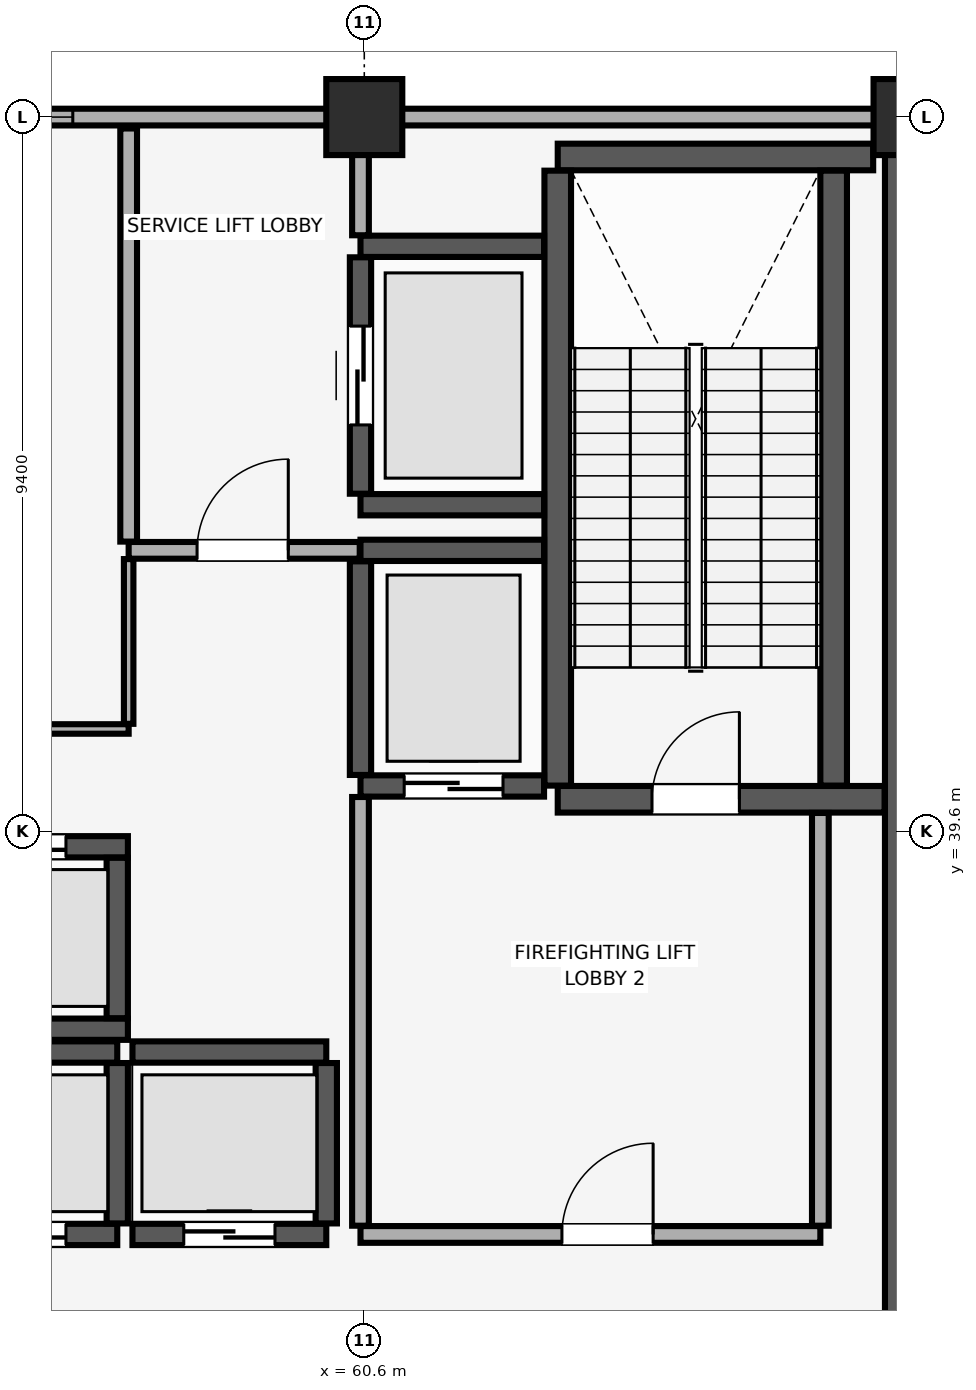
"""IFC4 building model, lengths in metres.
Left out: names, types, materials, properties, quantities, classifications, styles, units other than length and angle.
Written with IfcOpenShell. Run it as: python <this file> out.ifc"""

import sys

from ifc_helpers import new_model, si_unit, direction, frame, frame_2d, origin, origin_2d, place, context, subcontext, project, spatial, rectangle, extrude, element, fill, save


model = new_model("IFC4")
c1 = context("Model", 3, precision=1e-05, world=origin(), true_north=direction((0.0, 1.0)))
c2 = subcontext(c1, "Body", "Model", "MODEL_VIEW")
j1 = project(units=[si_unit("LENGTHUNIT", "METRE"), si_unit("PLANEANGLEUNIT", "RADIAN")], contexts=[c1])
p1 = place(None, origin())
s1 = spatial("IfcSite", under=j1, at=p1, CompositionType="ELEMENT")
p2 = place(p1, origin())
s2 = spatial("IfcBuilding", under=s1, at=p2, CompositionType="ELEMENT")
p3 = place(p2, frame((0.0, 0.0, 294.7)))
s3 = spatial("IfcBuildingStorey", under=s2, at=p3, CompositionType="ELEMENT", Elevation=294.7)
for number, where, z_axis, x_axis in (
    (1, (60.6, 49.0, 0.0), (0.0, 0.0, 1.0), (1.0, 0.0, 0.0)),
    (2, (67.8, 49.0, 0.0), (0.0, 0.0, 1.0), (1.0, 0.0, 0.0)),
):
    element("IfcColumn", number, at=place(p3, frame(where, z_axis=z_axis, x_axis=x_axis)), inside=s3, PredefinedType="COLUMN", context=c2, shape_type="SweptSolid", body=[
        extrude(rectangle(XDim=1.0, YDim=1.0, at=origin_2d()), origin(), (0.0, 0.0, 1.0), 5.12),
    ])
p4 = place(p3, frame((71.4, 49.0, 0.0), z_axis=(0.0, 0.0, 1.0), x_axis=(-1.0, 0.0, 0.0)))
e3 = element("IfcWall", 3, at=p4, inside=s3, PredefinedType="SOLIDWALL", context=c2, shape_type="SweptSolid", body=[
    extrude(rectangle(XDim=58.8, YDim=0.22, at=frame_2d((29.4, 0.0))), origin(), (0.0, 0.0, 1.0), 4.32),
])
p5 = place(p4, frame((56.365, 0.0, 0.85)))
e4 = element("IfcOpeningElement", 4, at=p5, cuts=e3, PredefinedType="OPENING", context=c2, shape_type="SweptSolid", body=[
    extrude(rectangle(XDim=1.5, YDim=1.4, at=frame_2d((0.75, 0.7))), frame((0.0, 0.12, 0.0), z_axis=(0.0, -1.0, 0.0), x_axis=(1.0, 0.0, 0.0)), (0.0, 0.0, 1.0), 0.24),
])
p6 = place(p4, frame((0.935, 0.0, 0.85)))
e5 = element("IfcOpeningElement", 5, at=p6, cuts=e3, PredefinedType="OPENING", context=c2, shape_type="SweptSolid", body=[
    extrude(rectangle(XDim=1.5, YDim=1.4, at=frame_2d((0.75, 0.7))), frame((0.0, 0.12, 0.0), z_axis=(0.0, -1.0, 0.0), x_axis=(1.0, 0.0, 0.0)), (0.0, 0.0, 1.0), 0.24),
])
p7 = place(p4, frame((43.865, 0.0, 0.9)))
e6 = element("IfcOpeningElement", 6, at=p7, cuts=e3, PredefinedType="OPENING", context=c2, shape_type="SweptSolid", body=[
    extrude(rectangle(XDim=1.5, YDim=1.4, at=frame_2d((0.75, 0.7))), frame((0.0, 0.12, 0.0), z_axis=(0.0, -1.0, 0.0), x_axis=(1.0, 0.0, 0.0)), (0.0, 0.0, 1.0), 0.24),
])
p8 = place(p4, frame((36.05, 0.0, 0.9)))
e7 = element("IfcOpeningElement", 7, at=p8, cuts=e3, PredefinedType="OPENING", context=c2, shape_type="SweptSolid", body=[
    extrude(rectangle(XDim=3.6, YDim=1.5, at=frame_2d((1.8, 0.75))), frame((0.0, 0.12, 0.0), z_axis=(0.0, -1.0, 0.0), x_axis=(1.0, 0.0, 0.0)), (0.0, 0.0, 1.0), 0.24),
])
p9 = place(p4, frame((22.65, 0.0, 0.9)))
e8 = element("IfcOpeningElement", 8, at=p9, cuts=e3, PredefinedType="OPENING", context=c2, shape_type="SweptSolid", body=[
    extrude(rectangle(XDim=1.5, YDim=1.4, at=frame_2d((0.75, 0.7))), frame((0.0, 0.12, 0.0), z_axis=(0.0, -1.0, 0.0), x_axis=(1.0, 0.0, 0.0)), (0.0, 0.0, 1.0), 0.24),
])
p10 = place(p4, frame((19.0, 0.0, 0.9)))
e9 = element("IfcOpeningElement", 9, at=p10, cuts=e3, PredefinedType="OPENING", context=c2, shape_type="SweptSolid", body=[
    extrude(rectangle(XDim=2.4, YDim=1.5, at=frame_2d((1.2, 0.75))), frame((0.0, 0.12, 0.0), z_axis=(0.0, -1.0, 0.0), x_axis=(1.0, 0.0, 0.0)), (0.0, 0.0, 1.0), 0.24),
])
p11 = place(p4, frame((14.635, 0.0, 0.9)))
e10 = element("IfcOpeningElement", 10, at=p11, cuts=e3, PredefinedType="OPENING", context=c2, shape_type="SweptSolid", body=[
    extrude(rectangle(XDim=2.4, YDim=1.5, at=frame_2d((1.2, 0.75))), frame((0.0, 0.12, 0.0), z_axis=(0.0, -1.0, 0.0), x_axis=(1.0, 0.0, 0.0)), (0.0, 0.0, 1.0), 0.24),
])
p12 = place(p3, frame((67.8, 29.4, 0.0), z_axis=(0.0, 0.0, 1.0), x_axis=(0.0, 1.0, 0.0)))
e11 = element("IfcWall", 11, at=p12, inside=s3, PredefinedType="SHEAR", context=c2, shape_type="SweptSolid", body=[
    extrude(rectangle(XDim=19.2, YDim=0.7, at=frame_2d((9.6, 0.0))), origin(), (0.0, 0.0, 1.0), 5.12),
])
p13 = place(p3, frame((63.145, 40.025, 0.0), z_axis=(0.0, 0.0, 1.0), x_axis=(1.0, 0.0, 0.0)))
e12 = element("IfcWall", 12, at=p13, inside=s3, PredefinedType="SHEAR", context=c2, shape_type="SweptSolid", body=[
    extrude(rectangle(XDim=4.3, YDim=0.35, at=frame_2d((2.15, 0.0))), origin(), (0.0, 0.0, 1.0), 5.12),
])
p14 = place(p13, frame((1.24, 0.0, 0.0)))
e13 = element("IfcOpeningElement", 13, at=p14, cuts=e12, PredefinedType="OPENING", context=c2, shape_type="SweptSolid", body=[
    extrude(rectangle(XDim=1.15, YDim=2.15, at=frame_2d((0.575, 1.075))), frame((0.0, 0.185, 0.0), z_axis=(0.0, -1.0, 0.0), x_axis=(1.0, 0.0, 0.0)), (0.0, 0.0, 1.0), 0.37),
])
p15 = place(p3, frame((63.145, 48.475, 0.0), z_axis=(0.0, 0.0, 1.0), x_axis=(1.0, 0.0, 0.0)))
e14 = element("IfcWall", 14, at=p15, inside=s3, PredefinedType="SHEAR", context=c2, shape_type="SweptSolid", body=[
    extrude(rectangle(XDim=4.15, YDim=0.35, at=frame_2d((2.075, 0.0))), origin(), (0.0, 0.0, 1.0), 5.12),
])
for number, where, z_axis, x_axis in (
    (15, (63.145, 40.205, 0.0), (0.0, 0.0, 1.0), (0.0, 1.0, 0.0)),
    (16, (66.775, 40.205, 0.0), (0.0, 0.0, 1.0), (0.0, 1.0, 0.0)),
):
    element("IfcWall", number, at=place(p3, frame(where, z_axis=z_axis, x_axis=x_axis)), inside=s3, PredefinedType="SHEAR", context=c2, shape_type="SweptSolid", body=[
        extrude(rectangle(XDim=8.09, YDim=0.35, at=frame_2d((4.045, 0.0))), origin(), (0.0, 0.0, 1.0), 5.12),
    ])
p16 = place(p3, frame((54.8, 34.3, 0.0), z_axis=(0.0, 0.0, 1.0), x_axis=(1.0, 0.0, 0.0)))
e17 = element("IfcWall", 17, at=p16, inside=s3, PredefinedType="SHEAR", context=c2, shape_type="SweptSolid", body=[
    extrude(rectangle(XDim=2.55, YDim=0.28, at=frame_2d((1.275, 0.0))), origin(), (0.0, 0.0, 1.0), 5.12),
])
p17 = place(p16, frame((0.675, 0.0, 0.0)))
e18 = element("IfcOpeningElement", 18, at=p17, cuts=e17, PredefinedType="OPENING", context=c2, shape_type="SweptSolid", body=[
    extrude(rectangle(XDim=1.2, YDim=2.25, at=frame_2d((0.6, 1.125))), frame((0.0, 0.15, 0.0), z_axis=(0.0, -1.0, 0.0), x_axis=(1.0, 0.0, 0.0)), (0.0, 0.0, 1.0), 0.3),
])
p18 = place(p3, frame((54.8, 36.7, 0.0), z_axis=(0.0, 0.0, 1.0), x_axis=(1.0, 0.0, 0.0)))
e19 = element("IfcWall", 19, at=p18, inside=s3, PredefinedType="SHEAR", context=c2, shape_type="SweptSolid", body=[
    extrude(rectangle(XDim=2.55, YDim=0.28, at=frame_2d((1.275, 0.0))), origin(), (0.0, 0.0, 1.0), 5.12),
])
p19 = place(p3, frame((57.35, 34.445, 0.0), z_axis=(0.0, 0.0, 1.0), x_axis=(0.0, 1.0, 0.0)))
e20 = element("IfcWall", 20, at=p19, inside=s3, PredefinedType="SHEAR", context=c2, shape_type="SweptSolid", body=[
    extrude(rectangle(XDim=2.11, YDim=0.28, at=frame_2d((1.055, 0.0))), origin(), (0.0, 0.0, 1.0), 5.12),
])
p20 = place(p3, frame((57.55, 34.3, 0.0), z_axis=(0.0, 0.0, 1.0), x_axis=(1.0, 0.0, 0.0)))
e21 = element("IfcWall", 21, at=p20, inside=s3, PredefinedType="SHEAR", context=c2, shape_type="SweptSolid", body=[
    extrude(rectangle(XDim=2.55, YDim=0.28, at=frame_2d((1.275, 0.0))), origin(), (0.0, 0.0, 1.0), 5.12),
])
p21 = place(p20, frame((0.675, 0.0, 0.0)))
e22 = element("IfcOpeningElement", 22, at=p21, cuts=e21, PredefinedType="OPENING", context=c2, shape_type="SweptSolid", body=[
    extrude(rectangle(XDim=1.2, YDim=2.25, at=frame_2d((0.6, 1.125))), frame((0.0, 0.15, 0.0), z_axis=(0.0, -1.0, 0.0), x_axis=(1.0, 0.0, 0.0)), (0.0, 0.0, 1.0), 0.3),
])
p22 = place(p3, frame((57.55, 36.7, 0.0), z_axis=(0.0, 0.0, 1.0), x_axis=(1.0, 0.0, 0.0)))
e23 = element("IfcWall", 23, at=p22, inside=s3, PredefinedType="SHEAR", context=c2, shape_type="SweptSolid", body=[
    extrude(rectangle(XDim=2.55, YDim=0.28, at=frame_2d((1.275, 0.0))), origin(), (0.0, 0.0, 1.0), 5.12),
])
p23 = place(p3, frame((60.1, 34.445, 0.0), z_axis=(0.0, 0.0, 1.0), x_axis=(0.0, 1.0, 0.0)))
e24 = element("IfcWall", 24, at=p23, inside=s3, PredefinedType="SHEAR", context=c2, shape_type="SweptSolid", body=[
    extrude(rectangle(XDim=2.11, YDim=0.28, at=frame_2d((1.055, 0.0))), origin(), (0.0, 0.0, 1.0), 5.12),
])
p24 = place(p3, frame((54.66, 37.0, 0.0), z_axis=(0.0, 0.0, 1.0), x_axis=(1.0, 0.0, 0.0)))
e25 = element("IfcWall", 25, at=p24, inside=s3, PredefinedType="SHEAR", context=c2, shape_type="SweptSolid", body=[
    extrude(rectangle(XDim=2.83, YDim=0.28, at=frame_2d((1.415, 0.0))), origin(), (0.0, 0.0, 1.0), 5.12),
])
p25 = place(p3, frame((54.66, 39.4, 0.0), z_axis=(0.0, 0.0, 1.0), x_axis=(1.0, 0.0, 0.0)))
e26 = element("IfcWall", 26, at=p25, inside=s3, PredefinedType="SHEAR", context=c2, shape_type="SweptSolid", body=[
    extrude(rectangle(XDim=2.83, YDim=0.28, at=frame_2d((1.415, 0.0))), origin(), (0.0, 0.0, 1.0), 5.12),
])
p26 = place(p25, frame((0.815, 0.0, 0.0)))
e27 = element("IfcOpeningElement", 27, at=p26, cuts=e26, PredefinedType="OPENING", context=c2, shape_type="SweptSolid", body=[
    extrude(rectangle(XDim=1.2, YDim=2.25, at=frame_2d((0.6, 1.125))), frame((0.0, 0.15, 0.0), z_axis=(0.0, -1.0, 0.0), x_axis=(1.0, 0.0, 0.0)), (0.0, 0.0, 1.0), 0.3),
])
p27 = place(p3, frame((57.35, 37.145, 0.0), z_axis=(0.0, 0.0, 1.0), x_axis=(0.0, 1.0, 0.0)))
e28 = element("IfcWall", 28, at=p27, inside=s3, PredefinedType="SHEAR", context=c2, shape_type="SweptSolid", body=[
    extrude(rectangle(XDim=2.11, YDim=0.28, at=frame_2d((1.055, 0.0))), origin(), (0.0, 0.0, 1.0), 5.12),
])
p28 = place(p3, frame((60.55, 40.2, 0.0), z_axis=(0.0, 0.0, 1.0), x_axis=(1.0, 0.0, 0.0)))
e29 = element("IfcWall", 29, at=p28, inside=s3, PredefinedType="SHEAR", context=c2, shape_type="SweptSolid", body=[
    extrude(rectangle(XDim=2.415, YDim=0.28, at=frame_2d((1.208, 0.0))), origin(), (0.0, 0.0, 1.0), 5.12),
])
p29 = place(p28, frame((0.575, 0.0, 0.0)))
e30 = element("IfcOpeningElement", 30, at=p29, cuts=e29, PredefinedType="OPENING", context=c2, shape_type="SweptSolid", body=[
    extrude(rectangle(XDim=1.3, YDim=2.3, at=frame_2d((0.65, 1.15))), frame((0.0, 0.15, 0.0), z_axis=(0.0, -1.0, 0.0), x_axis=(1.0, 0.0, 0.0)), (0.0, 0.0, 1.0), 0.3),
])
p30 = place(p3, frame((60.55, 43.3, 0.0), z_axis=(0.0, 0.0, 1.0), x_axis=(1.0, 0.0, 0.0)))
e31 = element("IfcWall", 31, at=p30, inside=s3, PredefinedType="SHEAR", context=c2, shape_type="SweptSolid", body=[
    extrude(rectangle(XDim=2.415, YDim=0.28, at=frame_2d((1.208, 0.0))), origin(), (0.0, 0.0, 1.0), 5.12),
])
p31 = place(p3, frame((60.55, 40.345, 0.0), z_axis=(0.0, 0.0, 1.0), x_axis=(0.0, 1.0, 0.0)))
e32 = element("IfcWall", 32, at=p31, inside=s3, PredefinedType="SHEAR", context=c2, shape_type="SweptSolid", body=[
    extrude(rectangle(XDim=2.81, YDim=0.28, at=frame_2d((1.405, 0.0))), origin(), (0.0, 0.0, 1.0), 5.12),
])
for number, where, z_axis, x_axis in (
    (33, (60.55, 43.9, 0.0), (0.0, 0.0, 1.0), (1.0, 0.0, 0.0)),
    (34, (60.55, 47.3, 0.0), (0.0, 0.0, 1.0), (1.0, 0.0, 0.0)),
):
    element("IfcWall", number, at=place(p3, frame(where, z_axis=z_axis, x_axis=x_axis)), inside=s3, PredefinedType="SHEAR", context=c2, shape_type="SweptSolid", body=[
        extrude(rectangle(XDim=2.415, YDim=0.28, at=frame_2d((1.208, 0.0))), origin(), (0.0, 0.0, 1.0), 5.12),
    ])
p32 = place(p3, frame((60.55, 44.045, 0.0), z_axis=(0.0, 0.0, 1.0), x_axis=(0.0, 1.0, 0.0)))
e35 = element("IfcWall", 35, at=p32, inside=s3, PredefinedType="SHEAR", context=c2, shape_type="SweptSolid", body=[
    extrude(rectangle(XDim=3.11, YDim=0.28, at=frame_2d((1.555, 0.0))), origin(), (0.0, 0.0, 1.0), 5.12),
])
p33 = place(p32, frame((0.905, 0.0, 0.0)))
e36 = element("IfcOpeningElement", 36, at=p33, cuts=e35, PredefinedType="OPENING", context=c2, shape_type="SweptSolid", body=[
    extrude(rectangle(XDim=1.3, YDim=2.3, at=frame_2d((0.65, 1.15))), frame((0.0, 0.15, 0.0), z_axis=(0.0, -1.0, 0.0), x_axis=(1.0, 0.0, 0.0)), (0.0, 0.0, 1.0), 0.3),
])
p34 = place(p3, frame((60.55, 34.3, 0.0), z_axis=(0.0, 0.0, 1.0), x_axis=(1.0, 0.0, 0.0)))
e37 = element("IfcWall", 37, at=p34, inside=s3, PredefinedType="PARTITIONING", context=c2, shape_type="SweptSolid", body=[
    extrude(rectangle(XDim=6.05, YDim=0.22, at=frame_2d((3.025, 0.0))), origin(), (0.0, 0.0, 1.0), 5.12),
])
p35 = place(p34, frame((2.65, 0.0, 0.0)))
e38 = element("IfcOpeningElement", 38, at=p35, cuts=e37, PredefinedType="OPENING", context=c2, shape_type="SweptSolid", body=[
    extrude(rectangle(XDim=1.2, YDim=2.15, at=frame_2d((0.6, 1.075))), frame((0.0, 0.12, 0.0), z_axis=(0.0, -1.0, 0.0), x_axis=(1.0, 0.0, 0.0)), (0.0, 0.0, 1.0), 0.24),
])
p36 = place(p3, frame((60.55, 34.415, 0.0), z_axis=(0.0, 0.0, 1.0), x_axis=(0.0, 1.0, 0.0)))
e39 = element("IfcWall", 39, at=p36, inside=s3, PredefinedType="PARTITIONING", context=c2, shape_type="SweptSolid", body=[
    extrude(rectangle(XDim=5.64, YDim=0.22, at=frame_2d((2.82, 0.0))), origin(), (0.0, 0.0, 1.0), 5.12),
])
p37 = place(p3, frame((66.6, 34.415, 0.0), z_axis=(0.0, 0.0, 1.0), x_axis=(0.0, 1.0, 0.0)))
e40 = element("IfcWall", 40, at=p37, inside=s3, PredefinedType="PARTITIONING", context=c2, shape_type="SweptSolid", body=[
    extrude(rectangle(XDim=5.43, YDim=0.22, at=frame_2d((2.715, 0.0))), origin(), (0.0, 0.0, 1.0), 5.12),
])
p38 = place(p3, frame((57.5, 43.3, 0.0), z_axis=(0.0, 0.0, 1.0), x_axis=(1.0, 0.0, 0.0)))
e41 = element("IfcWall", 41, at=p38, inside=s3, PredefinedType="PARTITIONING", context=c2, shape_type="SweptSolid", body=[
    extrude(rectangle(XDim=3.04, YDim=0.22, at=frame_2d((1.52, 0.0))), origin(), (0.0, 0.0, 1.0), 5.12),
])
p39 = place(p38, frame((0.9, 0.0, 0.0)))
e42 = element("IfcOpeningElement", 42, at=p39, cuts=e41, PredefinedType="OPENING", context=c2, shape_type="SweptSolid", body=[
    extrude(rectangle(XDim=1.2, YDim=2.15, at=frame_2d((0.6, 1.075))), frame((0.0, 0.12, 0.0), z_axis=(0.0, -1.0, 0.0), x_axis=(1.0, 0.0, 0.0)), (0.0, 0.0, 1.0), 0.24),
])
p40 = place(p3, frame((57.5, 43.415, 0.0), z_axis=(0.0, 0.0, 1.0), x_axis=(0.0, 1.0, 0.0)))
e43 = element("IfcWall", 43, at=p40, inside=s3, PredefinedType="PARTITIONING", context=c2, shape_type="SweptSolid", body=[
    extrude(rectangle(XDim=5.435, YDim=0.22, at=frame_2d((2.718, 0.0))), origin(), (0.0, 0.0, 1.0), 5.12),
])
p41 = place(p3, frame((60.55, 47.445, 0.0), z_axis=(0.0, 0.0, 1.0), x_axis=(0.0, 1.0, 0.0)))
e44 = element("IfcWall", 44, at=p41, inside=s3, PredefinedType="PARTITIONING", context=c2, shape_type="SweptSolid", body=[
    extrude(rectangle(XDim=1.405, YDim=0.22, at=frame_2d((0.703, 0.0))), origin(), (0.0, 0.0, 1.0), 5.12),
])
p42 = place(p3, frame((49.468, 40.95, 0.0), z_axis=(0.0, 0.0, 1.0), x_axis=(1.0, 0.0, 0.0)))
e45 = element("IfcWall", 45, at=p42, inside=s3, PredefinedType="PARTITIONING", context=c2, shape_type="SweptSolid", body=[
    extrude(rectangle(XDim=8.032, YDim=0.125, at=frame_2d((4.016, 0.0))), origin(), (0.0, 0.0, 1.0), 5.12),
])
p43 = place(p42, frame((4.782, 0.0, 0.0)))
e46 = element("IfcOpeningElement", 46, at=p43, cuts=e45, PredefinedType="OPENING", context=c2, shape_type="SweptSolid", body=[
    extrude(rectangle(XDim=0.9, YDim=2.1, at=frame_2d((0.45, 1.05))), frame((0.0, 0.073, 0.0), z_axis=(0.0, -1.0, 0.0), x_axis=(1.0, 0.0, 0.0)), (0.0, 0.0, 1.0), 0.145),
])
p44 = place(p3, frame((57.5, 41.018, 0.0), z_axis=(0.0, 0.0, 1.0), x_axis=(0.0, 1.0, 0.0)))
e47 = element("IfcWall", 47, at=p44, inside=s3, PredefinedType="PARTITIONING", context=c2, shape_type="SweptSolid", body=[
    extrude(rectangle(XDim=2.167, YDim=0.125, at=frame_2d((1.084, 0.0))), origin(), (0.0, 0.0, 1.0), 5.12),
])
p45 = place(p11, origin())
e48 = element("IfcWindow", 48, at=p45, inside=s3, PartitioningType="SINGLE_PANEL", PredefinedType="WINDOW", context=c2, shape_type="SweptSolid", body=[
    extrude(rectangle(XDim=2.4, YDim=1.5, at=frame_2d((1.2, 0.75))), frame((0.0, 0.03, 0.0), z_axis=(0.0, -1.0, 0.0), x_axis=(1.0, 0.0, 0.0)), (0.0, 0.0, 1.0), 0.06),
])
fill(e10, e48)
p46 = place(p14, origin())
e49 = element("IfcDoor", 49, at=p46, inside=s3, OperationType="SINGLE_SWING_RIGHT", PredefinedType="DOOR", context=c2, shape_type="SweptSolid", body=[
    extrude(rectangle(XDim=1.15, YDim=2.15, at=frame_2d((0.575, 1.075))), frame((0.0, 0.025, 0.0), z_axis=(0.0, -1.0, 0.0), x_axis=(1.0, 0.0, 0.0)), (0.0, 0.0, 1.0), 0.05),
])
fill(e13, e49)
p47 = place(p17, origin())
e50 = element("IfcDoor", 50, at=p47, inside=s3, OperationType="DOUBLE_DOOR_SLIDING", PredefinedType="DOOR", context=c2, shape_type="SweptSolid", body=[
    extrude(rectangle(XDim=1.2, YDim=2.25, at=frame_2d((0.6, 1.125))), frame((0.0, 0.025, 0.0), z_axis=(0.0, -1.0, 0.0), x_axis=(1.0, 0.0, 0.0)), (0.0, 0.0, 1.0), 0.05),
])
fill(e18, e50)
p48 = place(p21, origin())
e51 = element("IfcDoor", 51, at=p48, inside=s3, OperationType="DOUBLE_DOOR_SLIDING", PredefinedType="DOOR", context=c2, shape_type="SweptSolid", body=[
    extrude(rectangle(XDim=1.2, YDim=2.25, at=frame_2d((0.6, 1.125))), frame((0.0, 0.025, 0.0), z_axis=(0.0, -1.0, 0.0), x_axis=(1.0, 0.0, 0.0)), (0.0, 0.0, 1.0), 0.05),
])
fill(e22, e51)
p49 = place(p26, origin())
e52 = element("IfcDoor", 52, at=p49, inside=s3, OperationType="DOUBLE_DOOR_SLIDING", PredefinedType="DOOR", context=c2, shape_type="SweptSolid", body=[
    extrude(rectangle(XDim=1.2, YDim=2.25, at=frame_2d((0.6, 1.125))), frame((0.0, 0.025, 0.0), z_axis=(0.0, -1.0, 0.0), x_axis=(1.0, 0.0, 0.0)), (0.0, 0.0, 1.0), 0.05),
])
fill(e27, e52)
p50 = place(p29, origin())
e53 = element("IfcDoor", 53, at=p50, inside=s3, OperationType="DOUBLE_DOOR_SLIDING", PredefinedType="DOOR", context=c2, shape_type="SweptSolid", body=[
    extrude(rectangle(XDim=1.3, YDim=2.3, at=frame_2d((0.65, 1.15))), frame((0.0, 0.025, 0.0), z_axis=(0.0, -1.0, 0.0), x_axis=(1.0, 0.0, 0.0)), (0.0, 0.0, 1.0), 0.05),
])
fill(e30, e53)
p51 = place(p33, origin())
e54 = element("IfcDoor", 54, at=p51, inside=s3, OperationType="DOUBLE_DOOR_SLIDING", PredefinedType="DOOR", context=c2, shape_type="SweptSolid", body=[
    extrude(rectangle(XDim=1.3, YDim=2.3, at=frame_2d((0.65, 1.15))), frame((0.0, 0.025, 0.0), z_axis=(0.0, -1.0, 0.0), x_axis=(1.0, 0.0, 0.0)), (0.0, 0.0, 1.0), 0.05),
])
fill(e36, e54)
p52 = place(p35, origin())
e55 = element("IfcDoor", 55, at=p52, inside=s3, OperationType="SINGLE_SWING_RIGHT", PredefinedType="DOOR", context=c2, shape_type="SweptSolid", body=[
    extrude(rectangle(XDim=1.2, YDim=2.15, at=frame_2d((0.6, 1.075))), frame((0.0, 0.025, 0.0), z_axis=(0.0, -1.0, 0.0), x_axis=(1.0, 0.0, 0.0)), (0.0, 0.0, 1.0), 0.05),
])
fill(e38, e55)
p53 = place(p39, origin())
e56 = element("IfcDoor", 56, at=p53, inside=s3, OperationType="SINGLE_SWING_RIGHT", PredefinedType="DOOR", context=c2, shape_type="SweptSolid", body=[
    extrude(rectangle(XDim=1.2, YDim=2.15, at=frame_2d((0.6, 1.075))), frame((0.0, 0.025, 0.0), z_axis=(0.0, -1.0, 0.0), x_axis=(1.0, 0.0, 0.0)), (0.0, 0.0, 1.0), 0.05),
])
fill(e42, e56)
save(model, sys.argv[1])
